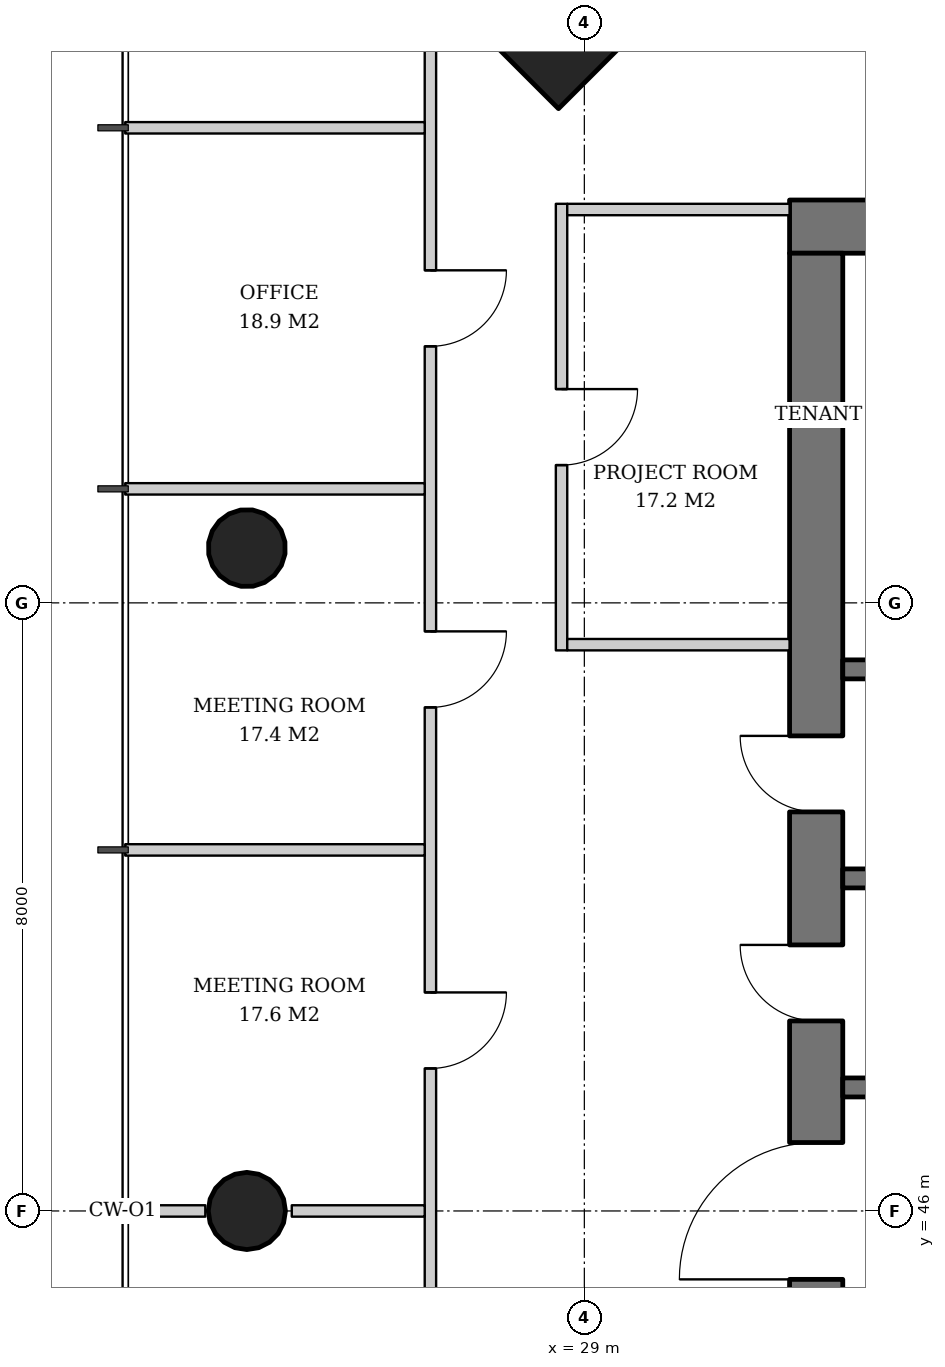
"""IFC4 building model, lengths in metres.
Left out: names, types, materials, properties, quantities, classifications, styles, units other than length and angle.
Written with IfcOpenShell. Run it as: python <this file> out.ifc"""

import sys

from ifc_helpers import new_model, si_unit, direction, frame, frame_2d, origin, origin_2d, place, context, subcontext, project, spatial, rectangle, hollow_circle, extrude, element, fill, save


model = new_model("IFC4")
c1 = context("Model", 3, precision=1e-05, world=origin(), true_north=direction((0.0, 1.0)))
c2 = subcontext(c1, "Body", "Model", "MODEL_VIEW")
j1 = project(units=[si_unit("LENGTHUNIT", "METRE"), si_unit("PLANEANGLEUNIT", "RADIAN")], contexts=[c1])
p1 = place(None, origin())
s1 = spatial("IfcSite", under=j1, at=p1, CompositionType="ELEMENT")
p2 = place(p1, origin())
s2 = spatial("IfcBuilding", under=s1, at=p2, CompositionType="ELEMENT")
p3 = place(p2, frame((0.0, 0.0, 131.2)))
s3 = spatial("IfcBuildingStorey", under=s2, at=p3, CompositionType="ELEMENT", Elevation=131.2)
p4 = place(p3, frame((28.621, 62.379, 0.0), z_axis=(0.031962158256, -0.031962158256, 0.998977898093), x_axis=(0.707106781187, 0.707106781187, 0.0)))
e1 = element("IfcColumn", 1, at=p4, inside=s3, PredefinedType="COLUMN", context=c2, shape_type="SweptSolid", body=[
    extrude(rectangle(XDim=2.6, YDim=2.6, at=origin_2d()), origin(), (0.0, 0.0, 1.0), 3.804),
])
p5 = place(p3, frame((24.521, 54.739, 0.0), z_axis=(0.031910269556, -0.015987237665, 0.999362868496), x_axis=(0.447933021895, 0.894067115991, 0.0)))
e2 = element("IfcColumn", 2, at=p5, inside=s3, PredefinedType="COLUMN", context=c2, shape_type="SweptSolid", body=[
    extrude(hollow_circle(Radius=0.508, WallThickness=0.04, at=origin_2d()), origin(), (0.0, 0.0, 1.0), 3.802),
])
p6 = place(p3, frame((24.521, 46.0, 0.0), z_axis=(0.031914348339, 0.0, 0.999490607445), x_axis=(0.0, 1.0, 0.0)))
e3 = element("IfcColumn", 3, at=p6, inside=s3, PredefinedType="COLUMN", context=c2, shape_type="SweptSolid", body=[
    extrude(hollow_circle(Radius=0.508, WallThickness=0.04, at=origin_2d()), origin(), (0.0, 0.0, 1.0), 3.802),
])
p7 = place(p3, frame((31.7, 58.95, 0.0), z_axis=(0.0, 0.0, 1.0), x_axis=(1.0, 0.0, 0.0)))
e4 = element("IfcWall", 4, at=p7, inside=s3, PredefinedType="SHEAR", context=c2, shape_type="SweptSolid", body=[
    extrude(rectangle(XDim=26.6, YDim=0.7, at=frame_2d((13.3, 0.0))), origin(), (0.0, 0.0, 1.0), 3.8),
])
p8 = place(p7, frame((17.94, 0.0, 0.0)))
e5 = element("IfcOpeningElement", 5, at=p8, cuts=e4, PredefinedType="OPENING", context=c2, shape_type="SweptSolid", body=[
    extrude(rectangle(XDim=1.0, YDim=2.1, at=frame_2d((0.5, 1.05))), frame((0.0, 0.36, 0.0), z_axis=(0.0, -1.0, 0.0), x_axis=(1.0, 0.0, 0.0)), (0.0, 0.0, 1.0), 0.72),
])
p9 = place(p7, frame((5.825, 0.0, 0.0)))
e6 = element("IfcOpeningElement", 6, at=p9, cuts=e4, PredefinedType="OPENING", context=c2, shape_type="SweptSolid", body=[
    extrude(rectangle(XDim=1.0, YDim=2.1, at=frame_2d((0.5, 1.05))), frame((0.0, 0.36, 0.0), z_axis=(0.0, -1.0, 0.0), x_axis=(1.0, 0.0, 0.0)), (0.0, 0.0, 1.0), 0.72),
])
p10 = place(p7, frame((1.169, 0.0, 0.0)))
e7 = element("IfcOpeningElement", 7, at=p10, cuts=e4, PredefinedType="OPENING", context=c2, shape_type="SweptSolid", body=[
    extrude(rectangle(XDim=1.0, YDim=2.1, at=frame_2d((0.5, 1.05))), frame((0.0, 0.36, 0.0), z_axis=(0.0, -1.0, 0.0), x_axis=(1.0, 0.0, 0.0)), (0.0, 0.0, 1.0), 0.72),
])
p11 = place(p7, frame((3.447, 0.0, 0.0)))
e8 = element("IfcOpeningElement", 8, at=p11, cuts=e4, PredefinedType="OPENING", context=c2, shape_type="SweptSolid", body=[
    extrude(rectangle(XDim=1.0, YDim=2.1, at=frame_2d((0.5, 1.05))), frame((0.0, 0.36, 0.0), z_axis=(0.0, -1.0, 0.0), x_axis=(1.0, 0.0, 0.0)), (0.0, 0.0, 1.0), 0.72),
])
p12 = place(p7, frame((8.342, 0.0, 0.0)))
e9 = element("IfcOpeningElement", 9, at=p12, cuts=e4, PredefinedType="OPENING", context=c2, shape_type="SweptSolid", body=[
    extrude(rectangle(XDim=1.0, YDim=2.1, at=frame_2d((0.5, 1.05))), frame((0.0, 0.36, 0.0), z_axis=(0.0, -1.0, 0.0), x_axis=(1.0, 0.0, 0.0)), (0.0, 0.0, 1.0), 0.72),
])
p13 = place(p7, frame((11.626, 0.0, 0.0)))
e10 = element("IfcOpeningElement", 10, at=p13, cuts=e4, PredefinedType="OPENING", context=c2, shape_type="SweptSolid", body=[
    extrude(rectangle(XDim=1.0, YDim=2.1, at=frame_2d((0.5, 1.05))), frame((0.0, 0.36, 0.0), z_axis=(0.0, -1.0, 0.0), x_axis=(1.0, 0.0, 0.0)), (0.0, 0.0, 1.0), 0.72),
])
p14 = place(p7, frame((14.862, 0.0, 0.0)))
e11 = element("IfcOpeningElement", 11, at=p14, cuts=e4, PredefinedType="OPENING", context=c2, shape_type="SweptSolid", body=[
    extrude(rectangle(XDim=1.0, YDim=2.1, at=frame_2d((0.5, 1.05))), frame((0.0, 0.36, 0.0), z_axis=(0.0, -1.0, 0.0), x_axis=(1.0, 0.0, 0.0)), (0.0, 0.0, 1.0), 0.72),
])
p15 = place(p7, frame((20.9, 0.0, 0.0)))
e12 = element("IfcOpeningElement", 12, at=p15, cuts=e4, PredefinedType="OPENING", context=c2, shape_type="SweptSolid", body=[
    extrude(rectangle(XDim=1.0, YDim=2.1, at=frame_2d((0.5, 1.05))), frame((0.0, 0.36, 0.0), z_axis=(0.0, -1.0, 0.0), x_axis=(1.0, 0.0, 0.0)), (0.0, 0.0, 1.0), 0.72),
])
p16 = place(p7, frame((23.75, 0.0, 0.0)))
e13 = element("IfcOpeningElement", 13, at=p16, cuts=e4, PredefinedType="OPENING", context=c2, shape_type="SweptSolid", body=[
    extrude(rectangle(XDim=1.0, YDim=2.1, at=frame_2d((0.5, 1.05))), frame((0.0, 0.36, 0.0), z_axis=(0.0, -1.0, 0.0), x_axis=(1.0, 0.0, 0.0)), (0.0, 0.0, 1.0), 0.72),
])
p17 = place(p3, frame((32.05, 33.4, 0.0), z_axis=(0.0, 0.0, 1.0), x_axis=(0.0, 1.0, 0.0)))
e14 = element("IfcWall", 14, at=p17, inside=s3, PredefinedType="SHEAR", context=c2, shape_type="SweptSolid", body=[
    extrude(rectangle(XDim=25.2, YDim=0.7, at=frame_2d((12.6, 0.0))), origin(), (0.0, 0.0, 1.0), 3.8),
])
p18 = place(p17, frame((11.7, 0.0, 0.0)))
e15 = element("IfcOpeningElement", 15, at=p18, cuts=e14, PredefinedType="OPENING", context=c2, shape_type="SweptSolid", body=[
    extrude(rectangle(XDim=1.8, YDim=2.4, at=frame_2d((0.9, 1.2))), frame((0.0, 0.36, 0.0), z_axis=(0.0, -1.0, 0.0), x_axis=(1.0, 0.0, 0.0)), (0.0, 0.0, 1.0), 0.72),
])
p19 = place(p17, frame((3.6, 0.0, 0.0)))
e16 = element("IfcOpeningElement", 16, at=p19, cuts=e14, PredefinedType="OPENING", context=c2, shape_type="SweptSolid", body=[
    extrude(rectangle(XDim=1.0, YDim=2.1, at=frame_2d((0.5, 1.05))), frame((0.0, 0.36, 0.0), z_axis=(0.0, -1.0, 0.0), x_axis=(1.0, 0.0, 0.0)), (0.0, 0.0, 1.0), 0.72),
])
p20 = place(p17, frame((6.35, 0.0, 0.0)))
e17 = element("IfcOpeningElement", 17, at=p20, cuts=e14, PredefinedType="OPENING", context=c2, shape_type="SweptSolid", body=[
    extrude(rectangle(XDim=1.0, YDim=2.1, at=frame_2d((0.5, 1.05))), frame((0.0, 0.36, 0.0), z_axis=(0.0, -1.0, 0.0), x_axis=(1.0, 0.0, 0.0)), (0.0, 0.0, 1.0), 0.72),
])
p21 = place(p17, frame((9.1, 0.0, 0.0)))
e18 = element("IfcOpeningElement", 18, at=p21, cuts=e14, PredefinedType="OPENING", context=c2, shape_type="SweptSolid", body=[
    extrude(rectangle(XDim=1.0, YDim=2.1, at=frame_2d((0.5, 1.05))), frame((0.0, 0.36, 0.0), z_axis=(0.0, -1.0, 0.0), x_axis=(1.0, 0.0, 0.0)), (0.0, 0.0, 1.0), 0.72),
])
p22 = place(p17, frame((15.1, 0.0, 0.0)))
e19 = element("IfcOpeningElement", 19, at=p22, cuts=e14, PredefinedType="OPENING", context=c2, shape_type="SweptSolid", body=[
    extrude(rectangle(XDim=1.0, YDim=2.1, at=frame_2d((0.5, 1.05))), frame((0.0, 0.36, 0.0), z_axis=(0.0, -1.0, 0.0), x_axis=(1.0, 0.0, 0.0)), (0.0, 0.0, 1.0), 0.72),
])
p23 = place(p17, frame((17.85, 0.0, 0.0)))
e20 = element("IfcOpeningElement", 20, at=p23, cuts=e14, PredefinedType="OPENING", context=c2, shape_type="SweptSolid", body=[
    extrude(rectangle(XDim=1.0, YDim=2.1, at=frame_2d((0.5, 1.05))), frame((0.0, 0.36, 0.0), z_axis=(0.0, -1.0, 0.0), x_axis=(1.0, 0.0, 0.0)), (0.0, 0.0, 1.0), 0.72),
])
for number, where, z_axis, x_axis in (
    (21, (32.4, 47.625, 0.0), (0.0, 0.0, 1.0), (1.0, 0.0, 0.0)),
    (22, (32.4, 50.375, 0.0), (0.0, 0.0, 1.0), (1.0, 0.0, 0.0)),
    (23, (32.4, 53.125, 0.0), (0.0, 0.0, 1.0), (1.0, 0.0, 0.0)),
):
    element("IfcWall", number, at=place(p3, frame(where, z_axis=z_axis, x_axis=x_axis)), inside=s3, PredefinedType="SHEAR", context=c2, shape_type="SweptSolid", body=[
        extrude(rectangle(XDim=2.7, YDim=0.25, at=frame_2d((1.35, 0.0))), origin(), (0.0, 0.0, 1.0), 3.8),
    ])
p24 = place(p3, frame((28.7, 59.25, 0.0), z_axis=(0.0, 0.0, 1.0), x_axis=(0.0, -1.0, 0.0)))
e24 = element("IfcWall", 24, at=p24, inside=s3, PredefinedType="PARTITIONING", context=c2, shape_type="SweptSolid", body=[
    extrude(rectangle(XDim=5.875, YDim=0.15, at=frame_2d((2.938, 0.0))), origin(), (0.0, 0.0, 1.0), 2.72),
])
p25 = place(p24, frame((2.438, 0.0, 0.0)))
e25 = element("IfcOpeningElement", 25, at=p25, cuts=e24, PredefinedType="OPENING", context=c2, shape_type="SweptSolid", body=[
    extrude(rectangle(XDim=1.0, YDim=2.1, at=frame_2d((0.5, 1.05))), frame((0.0, 0.085, 0.0), z_axis=(0.0, -1.0, 0.0), x_axis=(1.0, 0.0, 0.0)), (0.0, 0.0, 1.0), 0.17),
])
p26 = place(p3, frame((31.7, 59.175, 0.0), z_axis=(0.0, 0.0, 1.0), x_axis=(-1.0, 0.0, 0.0)))
e26 = element("IfcWall", 26, at=p26, inside=s3, PredefinedType="PARTITIONING", context=c2, shape_type="SweptSolid", body=[
    extrude(rectangle(XDim=2.925, YDim=0.15, at=frame_2d((1.462, 0.0))), origin(), (0.0, 0.0, 1.0), 2.72),
])
p27 = place(p3, frame((31.7, 53.45, 0.0), z_axis=(0.0, 0.0, 1.0), x_axis=(-1.0, 0.0, 0.0)))
e27 = element("IfcWall", 27, at=p27, inside=s3, PredefinedType="PARTITIONING", context=c2, shape_type="SweptSolid", body=[
    extrude(rectangle(XDim=2.925, YDim=0.15, at=frame_2d((1.462, 0.0))), origin(), (0.0, 0.0, 1.0), 3.62),
])
p28 = place(p3, frame((26.975, 62.112, 0.0), z_axis=(0.0, 0.0, 1.0), x_axis=(0.0, -1.0, 0.0)))
e28 = element("IfcWall", 28, at=p28, inside=s3, PredefinedType="PARTITIONING", context=c2, shape_type="SweptSolid", body=[
    extrude(rectangle(XDim=32.223, YDim=0.15, at=frame_2d((16.112, 0.0))), origin(), (0.0, 0.0, 1.0), 2.72),
])
p29 = place(p28, frame((3.737, 0.0, 0.0)))
e29 = element("IfcOpeningElement", 29, at=p29, cuts=e28, PredefinedType="OPENING", context=c2, shape_type="SweptSolid", body=[
    extrude(rectangle(XDim=1.0, YDim=2.1, at=frame_2d((0.5, 1.05))), frame((0.0, 0.085, 0.0), z_axis=(0.0, -1.0, 0.0), x_axis=(1.0, 0.0, 0.0)), (0.0, 0.0, 1.0), 0.17),
])
p30 = place(p28, frame((8.487, 0.0, 0.0)))
e30 = element("IfcOpeningElement", 30, at=p30, cuts=e28, PredefinedType="OPENING", context=c2, shape_type="SweptSolid", body=[
    extrude(rectangle(XDim=1.0, YDim=2.1, at=frame_2d((0.5, 1.05))), frame((0.0, 0.085, 0.0), z_axis=(0.0, -1.0, 0.0), x_axis=(1.0, 0.0, 0.0)), (0.0, 0.0, 1.0), 0.17),
])
p31 = place(p28, frame((13.237, 0.0, 0.0)))
e31 = element("IfcOpeningElement", 31, at=p31, cuts=e28, PredefinedType="OPENING", context=c2, shape_type="SweptSolid", body=[
    extrude(rectangle(XDim=1.0, YDim=2.1, at=frame_2d((0.5, 1.05))), frame((0.0, 0.085, 0.0), z_axis=(0.0, -1.0, 0.0), x_axis=(1.0, 0.0, 0.0)), (0.0, 0.0, 1.0), 0.17),
])
p32 = place(p28, frame((18.086, 0.0, 0.0)))
e32 = element("IfcOpeningElement", 32, at=p32, cuts=e28, PredefinedType="OPENING", context=c2, shape_type="SweptSolid", body=[
    extrude(rectangle(XDim=0.8, YDim=2.1, at=frame_2d((0.4, 1.05))), frame((0.0, 0.085, 0.0), z_axis=(0.0, -1.0, 0.0), x_axis=(1.0, 0.0, 0.0)), (0.0, 0.0, 1.0), 0.17),
])
p33 = place(p28, frame((22.737, 0.0, 0.0)))
e33 = element("IfcOpeningElement", 33, at=p33, cuts=e28, PredefinedType="OPENING", context=c2, shape_type="SweptSolid", body=[
    extrude(rectangle(XDim=1.0, YDim=2.1, at=frame_2d((0.5, 1.05))), frame((0.0, 0.085, 0.0), z_axis=(0.0, -1.0, 0.0), x_axis=(1.0, 0.0, 0.0)), (0.0, 0.0, 1.0), 0.17),
])
p34 = place(p28, frame((27.586, 0.0, 0.0)))
e34 = element("IfcOpeningElement", 34, at=p34, cuts=e28, PredefinedType="OPENING", context=c2, shape_type="SweptSolid", body=[
    extrude(rectangle(XDim=0.8, YDim=2.1, at=frame_2d((0.4, 1.05))), frame((0.0, 0.085, 0.0), z_axis=(0.0, -1.0, 0.0), x_axis=(1.0, 0.0, 0.0)), (0.0, 0.0, 1.0), 0.17),
])
for number, where, z_axis, x_axis in (
    (35, (26.9, 60.25, 0.0), (0.0, 0.0, 1.0), (-1.0, 0.0, 0.0)),
    (36, (26.9, 55.5, 0.0), (0.0, 0.0, 1.0), (-1.0, 0.0, 0.0)),
    (37, (26.9, 50.75, 0.0), (0.0, 0.0, 1.0), (-1.0, 0.0, 0.0)),
):
    element("IfcWall", number, at=place(p3, frame(where, z_axis=z_axis, x_axis=x_axis)), inside=s3, PredefinedType="PARTITIONING", context=c2, shape_type="SweptSolid", body=[
        extrude(rectangle(XDim=3.94, YDim=0.15, at=frame_2d((1.97, 0.0))), origin(), (0.0, 0.0, 1.0), 2.82),
    ])
p35 = place(p3, frame((26.9, 46.0, 0.0), z_axis=(0.0, 0.0, 1.0), x_axis=(-1.0, 0.0, 0.0)))
e38 = element("IfcWall", 38, at=p35, inside=s3, PredefinedType="PARTITIONING", context=c2, shape_type="SweptSolid", body=[
    extrude(rectangle(XDim=1.749, YDim=0.15, at=frame_2d((0.875, 0.0))), origin(), (0.0, 0.0, 1.0), 3.62),
])
p36 = place(p3, frame((24.013, 46.0, 0.0), z_axis=(0.0, 0.0, 1.0), x_axis=(-1.0, 0.0, 0.0)))
e39 = element("IfcWall", 39, at=p36, inside=s3, PredefinedType="PARTITIONING", context=c2, shape_type="SweptSolid", body=[
    extrude(rectangle(XDim=1.053, YDim=0.15, at=frame_2d((0.527, 0.0))), origin(), (0.0, 0.0, 1.0), 3.62),
])
p37 = place(p18, origin())
e40 = element("IfcDoor", 40, at=p37, inside=s3, OperationType="DOUBLE_DOOR_SINGLE_SWING", PredefinedType="DOOR", context=c2, shape_type="SweptSolid", body=[
    extrude(rectangle(XDim=1.8, YDim=2.4, at=frame_2d((0.9, 1.2))), frame((0.0, 0.025, 0.0), z_axis=(0.0, -1.0, 0.0), x_axis=(1.0, 0.0, 0.0)), (0.0, 0.0, 1.0), 0.05),
])
fill(e15, e40)
p38 = place(p22, origin())
e41 = element("IfcDoor", 41, at=p38, inside=s3, OperationType="SINGLE_SWING_RIGHT", PredefinedType="DOOR", context=c2, shape_type="SweptSolid", body=[
    extrude(rectangle(XDim=1.0, YDim=2.1, at=frame_2d((0.5, 1.05))), frame((0.0, -0.29, 0.0), z_axis=(0.0, -1.0, 0.0), x_axis=(1.0, 0.0, 0.0)), (0.0, 0.0, 1.0), 0.05),
])
fill(e19, e41)
p39 = place(p23, origin())
e42 = element("IfcDoor", 42, at=p39, inside=s3, OperationType="SINGLE_SWING_RIGHT", PredefinedType="DOOR", context=c2, shape_type="SweptSolid", body=[
    extrude(rectangle(XDim=1.0, YDim=2.1, at=frame_2d((0.5, 1.05))), frame((0.0, -0.29, 0.0), z_axis=(0.0, -1.0, 0.0), x_axis=(1.0, 0.0, 0.0)), (0.0, 0.0, 1.0), 0.05),
])
fill(e20, e42)
p40 = place(p25, origin())
e43 = element("IfcDoor", 43, at=p40, inside=s3, OperationType="SINGLE_SWING_LEFT", PredefinedType="DOOR", context=c2, shape_type="SweptSolid", body=[
    extrude(rectangle(XDim=1.0, YDim=2.1, at=frame_2d((0.5, 1.05))), frame((0.0, 0.025, 0.0), z_axis=(0.0, -1.0, 0.0), x_axis=(1.0, 0.0, 0.0)), (0.0, 0.0, 1.0), 0.05),
])
fill(e25, e43)
p41 = place(p29, origin())
e44 = element("IfcDoor", 44, at=p41, inside=s3, OperationType="SINGLE_SWING_LEFT", PredefinedType="DOOR", context=c2, shape_type="SweptSolid", body=[
    extrude(rectangle(XDim=1.0, YDim=2.1, at=frame_2d((0.5, 1.05))), frame((0.0, 0.025, 0.0), z_axis=(0.0, -1.0, 0.0), x_axis=(1.0, 0.0, 0.0)), (0.0, 0.0, 1.0), 0.05),
])
fill(e29, e44)
p42 = place(p30, origin())
e45 = element("IfcDoor", 45, at=p42, inside=s3, OperationType="SINGLE_SWING_LEFT", PredefinedType="DOOR", context=c2, shape_type="SweptSolid", body=[
    extrude(rectangle(XDim=1.0, YDim=2.1, at=frame_2d((0.5, 1.05))), frame((0.0, 0.025, 0.0), z_axis=(0.0, -1.0, 0.0), x_axis=(1.0, 0.0, 0.0)), (0.0, 0.0, 1.0), 0.05),
])
fill(e30, e45)
p43 = place(p31, origin())
e46 = element("IfcDoor", 46, at=p43, inside=s3, OperationType="SINGLE_SWING_LEFT", PredefinedType="DOOR", context=c2, shape_type="SweptSolid", body=[
    extrude(rectangle(XDim=1.0, YDim=2.1, at=frame_2d((0.5, 1.05))), frame((0.0, 0.025, 0.0), z_axis=(0.0, -1.0, 0.0), x_axis=(1.0, 0.0, 0.0)), (0.0, 0.0, 1.0), 0.05),
])
fill(e31, e46)
save(model, sys.argv[1])
